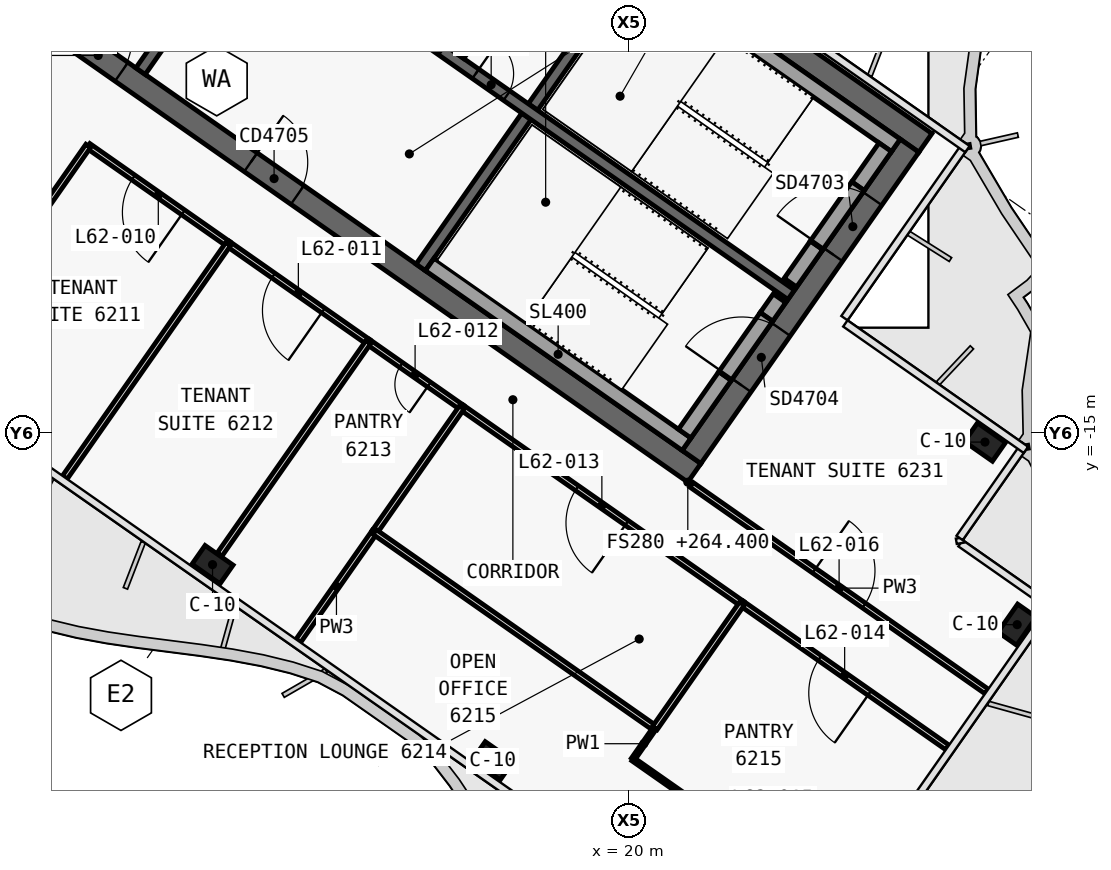
"""IFC4 building model, lengths in metres.
Left out: names, types, materials, properties, quantities, classifications, styles, units other than length and angle.
Written with IfcOpenShell. Run it as: python <this file> out.ifc"""

import sys

from ifc_helpers import new_model, si_unit, direction, frame, frame_2d, origin, origin_2d, place, context, subcontext, project, spatial, polyline, rectangle, outline, extrude, element, fill, save


model = new_model("IFC4")
c1 = context("Model", 3, precision=1e-05, world=origin(), true_north=direction((0.0, 1.0)))
c2 = subcontext(c1, "Body", "Model", "MODEL_VIEW")
j1 = project(units=[si_unit("LENGTHUNIT", "METRE"), si_unit("PLANEANGLEUNIT", "RADIAN")], contexts=[c1])
p1 = place(None, origin())
s1 = spatial("IfcSite", under=j1, at=p1, CompositionType="ELEMENT")
p2 = place(p1, origin())
s2 = spatial("IfcBuilding", under=s1, at=p2, CompositionType="ELEMENT")
p3 = place(p2, frame((0.0, 0.0, 264.4)))
s3 = spatial("IfcBuildingStorey", under=s2, at=p3, CompositionType="ELEMENT", Elevation=264.4)
p4 = place(p3, frame((0.028, 12.066, 0.0), z_axis=(0.0, 0.0, 1.0), x_axis=(0.819151382952, -0.573577380837, 0.0)))
e1 = element("IfcWall", 1, at=p4, inside=s3, PredefinedType="SHEAR", context=c2, shape_type="SweptSolid", body=[
    extrude(outline(polyline([(33.898, 0.3), (0.0, 0.3), (0.42, -0.3), (33.898, -0.3), (33.898, 0.3)])), origin(), (0.0, 0.0, 1.0), 3.9),
])
p5 = place(p3, frame((0.028, -0.874, 0.0), z_axis=(0.0, 0.0, 1.0), x_axis=(0.819150035022, -0.573579305871, 0.0)))
e2 = element("IfcWall", 2, at=p5, inside=s3, PredefinedType="SHEAR", context=c2, shape_type="SweptSolid", body=[
    extrude(outline(polyline([(26.476, 0.3), (0.0, 0.3), (0.42, -0.3), (26.476, -0.3), (26.476, 0.3)])), origin(), (0.0, 0.0, 1.0), 3.9),
])
p6 = place(p5, frame((6.576, 0.0, 0.0)))
e3 = element("IfcOpeningElement", 3, at=p6, cuts=e2, PredefinedType="OPENING", context=c2, shape_type="SweptSolid", body=[
    extrude(rectangle(XDim=1.5, YDim=2.1, at=frame_2d((0.75, 1.05))), frame((0.0, 0.31, 0.0), z_axis=(0.0, -1.0, 0.0), x_axis=(1.0, 0.0, 0.0)), (0.0, 0.0, 1.0), 0.62),
])
p7 = place(p5, frame((12.226, 0.0, 0.0)))
e4 = element("IfcOpeningElement", 4, at=p7, cuts=e2, PredefinedType="OPENING", context=c2, shape_type="SweptSolid", body=[
    extrude(rectangle(XDim=1.5, YDim=2.1, at=frame_2d((0.75, 1.05))), frame((0.0, 0.31, 0.0), z_axis=(0.0, -1.0, 0.0), x_axis=(1.0, 0.0, 0.0)), (0.0, 0.0, 1.0), 0.62),
])
p8 = place(p3, frame((21.642, -15.642, 0.0), z_axis=(0.0, 0.0, 1.0), x_axis=(0.573586866468, 0.819144740944, 0.0)))
e5 = element("IfcWall", 5, at=p8, inside=s3, PredefinedType="SHEAR", context=c2, shape_type="SweptSolid", body=[
    extrude(outline(polyline([(10.0, 0.3), (0.0, 0.3), (0.0, -0.3), (10.0, -0.3), (10.0, 0.3)])), origin(), (0.0, 0.0, 1.0), 3.9),
])
p9 = place(p8, frame((6.5, 0.0, 0.0)))
e6 = element("IfcOpeningElement", 6, at=p9, cuts=e5, PredefinedType="OPENING", context=c2, shape_type="SweptSolid", body=[
    extrude(rectangle(XDim=1.8, YDim=2.1, at=frame_2d((0.9, 1.05))), frame((0.0, 0.31, 0.0), z_axis=(0.0, -1.0, 0.0), x_axis=(1.0, 0.0, 0.0)), (0.0, 0.0, 1.0), 0.62),
])
p10 = place(p8, frame((2.3, 0.0, 0.0)))
e7 = element("IfcOpeningElement", 7, at=p10, cuts=e5, PredefinedType="OPENING", context=c2, shape_type="SweptSolid", body=[
    extrude(rectangle(XDim=1.8, YDim=2.1, at=frame_2d((0.9, 1.05))), frame((0.0, 0.31, 0.0), z_axis=(0.0, -1.0, 0.0), x_axis=(1.0, 0.0, 0.0)), (0.0, 0.0, 1.0), 0.62),
])
p11 = place(p3, frame((7.143, -5.49, 0.0), z_axis=(0.0, 0.0, 1.0), x_axis=(0.573617744349, 0.819123118565, 0.0)))
e8 = element("IfcWall", 8, at=p11, inside=s3, PredefinedType="SHEAR", context=c2, shape_type="SweptSolid", body=[
    extrude(outline(polyline([(0.0, 0.15), (0.0, -0.15), (4.85, -0.15), (4.85, 0.15), (0.0, 0.15)])), origin(), (0.0, 0.0, 1.0), 3.9),
])
p12 = place(p3, frame((14.515, -10.652, 0.0), z_axis=(0.0, 0.0, 1.0), x_axis=(0.573560315113, 0.819163332265, 0.0)))
e9 = element("IfcWall", 9, at=p12, inside=s3, PredefinedType="SHEAR", context=c2, shape_type="SweptSolid", body=[
    extrude(outline(polyline([(0.0, 0.15), (0.0, -0.15), (4.85, -0.15), (4.85, 0.15), (0.0, 0.15)])), origin(), (0.0, 0.0, 1.0), 3.9),
])
p13 = place(p3, frame((17.469, -6.433, 0.0), z_axis=(0.0, 0.0, 1.0), x_axis=(0.573594092424, 0.81913968109, 0.0)))
e10 = element("IfcWall", 10, at=p13, inside=s3, PredefinedType="SHEAR", context=c2, shape_type="SweptSolid", body=[
    extrude(outline(polyline([(4.85, -0.15), (4.85, 0.15), (0.0, 0.15), (0.0, -0.15), (4.85, -0.15)])), origin(), (0.0, 0.0, 1.0), 3.9),
])
p14 = place(p3, frame((2.638, 3.768, 0.0), z_axis=(0.0, 0.0, 1.0), x_axis=(0.819155014212, -0.573572194837, 0.0)))
e11 = element("IfcWall", 11, at=p14, inside=s3, PredefinedType="SHEAR", context=c2, shape_type="SweptSolid", body=[
    extrude(outline(polyline([(0.0, 0.15), (0.0, -0.15), (26.4, -0.15), (26.4, 0.15), (0.0, 0.15)])), origin(), (0.0, 0.0, 1.0), 3.9),
])
p15 = place(p14, frame((9.637, 0.0, 0.0)))
e12 = element("IfcOpeningElement", 12, at=p15, cuts=e11, PredefinedType="OPENING", context=c2, shape_type="SweptSolid", body=[
    extrude(rectangle(XDim=1.2, YDim=2.1, at=frame_2d((0.6, 1.05))), frame((0.0, 0.16, 0.0), z_axis=(0.0, -1.0, 0.0), x_axis=(1.0, 0.0, 0.0)), (0.0, 0.0, 1.0), 0.32),
])
p16 = place(p14, frame((11.812, 0.0, 0.0)))
e13 = element("IfcOpeningElement", 13, at=p16, cuts=e11, PredefinedType="OPENING", context=c2, shape_type="SweptSolid", body=[
    extrude(rectangle(XDim=1.2, YDim=2.1, at=frame_2d((0.6, 1.05))), frame((0.0, 0.16, 0.0), z_axis=(0.0, -1.0, 0.0), x_axis=(1.0, 0.0, 0.0)), (0.0, 0.0, 1.0), 0.32),
])
p17 = place(p14, frame((13.988, 0.0, 0.0)))
e14 = element("IfcOpeningElement", 14, at=p17, cuts=e11, PredefinedType="OPENING", context=c2, shape_type="SweptSolid", body=[
    extrude(rectangle(XDim=1.2, YDim=2.1, at=frame_2d((0.6, 1.05))), frame((0.0, 0.16, 0.0), z_axis=(0.0, -1.0, 0.0), x_axis=(1.0, 0.0, 0.0)), (0.0, 0.0, 1.0), 0.32),
])
p18 = place(p14, frame((16.262, 0.0, 0.0)))
e15 = element("IfcOpeningElement", 15, at=p18, cuts=e11, PredefinedType="OPENING", context=c2, shape_type="SweptSolid", body=[
    extrude(rectangle(XDim=1.0, YDim=2.1, at=frame_2d((0.5, 1.05))), frame((0.0, 0.16, 0.0), z_axis=(0.0, -1.0, 0.0), x_axis=(1.0, 0.0, 0.0)), (0.0, 0.0, 1.0), 0.32),
])
for number, where, z_axis, x_axis in (
    (16, (9.038, -18.475, 0.0), (0.0, 0.0, 1.0), (0.819, -0.574, 0.0)),
    (17, (16.41, -23.637, 0.0), (0.0, 0.0, 1.0), (0.819, -0.574, 0.0)),
    (18, (29.363, -15.25, 0.0), (0.0, 0.0, 1.0), (0.819, -0.574, 0.0)),
    (19, (30.21, -20.055, 0.0), (0.0, 0.0, 1.0), (0.574, 0.819, 0.0)),
):
    element("IfcColumn", number, at=place(p3, frame(where, z_axis=z_axis, x_axis=x_axis)), inside=s3, PredefinedType="COLUMN", context=c2, shape_type="SweptSolid", body=[
        extrude(rectangle(XDim=0.9, YDim=0.6, at=origin_2d()), origin(), (0.0, 0.0, 1.0), 3.9),
    ])
p19 = place(p3, frame((15.565, -5.1, 0.0), z_axis=(0.0, 0.0, 1.0), x_axis=(0.573560315113, 0.819163332265, 0.0)))
e20 = element("IfcWall", 20, at=p19, inside=s3, PredefinedType="SOLIDWALL", context=c2, shape_type="SweptSolid", body=[
    extrude(rectangle(XDim=4.85, YDim=0.2, at=frame_2d((2.425, 0.0))), origin(), (0.0, 0.0, 1.0), 3.9),
])
p20 = place(p3, frame((20.259, -2.71, 0.0), z_axis=(0.0, 0.0, 1.0), x_axis=(0.81914849389, -0.573581506813, 0.0)))
e21 = element("IfcWall", 21, at=p20, inside=s3, PredefinedType="SOLIDWALL", context=c2, shape_type="SweptSolid", body=[
    extrude(rectangle(XDim=8.25, YDim=0.4, at=frame_2d((4.125, 0.0))), origin(), (0.0, 0.0, 1.0), 3.62),
])
p21 = place(p3, frame((24.244, -11.055, 0.0), z_axis=(0.0, 0.0, 1.0), x_axis=(0.573571582932, 0.819155442668, 0.0)))
e22 = element("IfcWall", 22, at=p21, inside=s3, PredefinedType="SOLIDWALL", context=c2, shape_type="SweptSolid", body=[
    extrude(rectangle(XDim=1.2, YDim=0.4, at=frame_2d((0.6, 0.0))), origin(), (0.0, 0.0, 1.0), 3.62),
])
p22 = place(p3, frame((26.022, -8.515, 0.0), z_axis=(0.0, 0.0, 1.0), x_axis=(0.573619628835, 0.819121798889, 0.0)))
e23 = element("IfcWall", 23, at=p22, inside=s3, PredefinedType="SOLIDWALL", context=c2, shape_type="SweptSolid", body=[
    extrude(rectangle(XDim=1.25, YDim=0.4, at=frame_2d((0.625, 0.0))), origin(), (0.0, 0.0, 1.0), 3.62),
])
p23 = place(p3, frame((24.932, -10.072, 2.15), z_axis=(0.0, 0.0, 1.0), x_axis=(0.573591692345, 0.819141361715, 0.0)))
e24 = element("IfcWall", 24, at=p23, inside=s3, PredefinedType="SOLIDWALL", context=c2, shape_type="SweptSolid", body=[
    extrude(rectangle(XDim=1.9, YDim=0.4, at=frame_2d((0.95, 0.0))), origin(), (0.0, 0.0, 1.0), 1.47),
])
p24 = place(p3, frame((14.753, -10.574, 0.0), z_axis=(0.0, 0.0, 1.0), x_axis=(0.819158229677, -0.573567602601, 0.0)))
e25 = element("IfcWall", 25, at=p24, inside=s3, PredefinedType="SOLIDWALL", context=c2, shape_type="SweptSolid", body=[
    extrude(rectangle(XDim=8.25, YDim=0.4, at=frame_2d((4.125, 0.0))), origin(), (0.0, 0.0, 1.0), 3.62),
])
p25 = place(p3, frame((21.462, -15.028, 0.0), z_axis=(0.0, 0.0, 1.0), x_axis=(0.573559770908, 0.819163713305, 0.0)))
e26 = element("IfcWall", 26, at=p25, inside=s3, PredefinedType="SOLIDWALL", context=c2, shape_type="SweptSolid", body=[
    extrude(rectangle(XDim=1.85, YDim=0.4, at=frame_2d((0.925, 0.0))), origin(), (0.0, 0.0, 1.0), 3.62),
])
p26 = place(p3, frame((23.613, -11.956, 0.0), z_axis=(0.0, 0.0, 1.0), x_axis=(0.573435029941, 0.819251039936, 0.0)))
e27 = element("IfcWall", 27, at=p26, inside=s3, PredefinedType="SOLIDWALL", context=c2, shape_type="SweptSolid", body=[
    extrude(rectangle(XDim=0.6, YDim=0.4, at=frame_2d((0.3, 0.0))), origin(), (0.0, 0.0, 1.0), 3.62),
])
p27 = place(p3, frame((22.523, -13.512, 2.15), z_axis=(0.0, 0.0, 1.0), x_axis=(0.573591692345, 0.819141361715, 0.0)))
e28 = element("IfcWall", 28, at=p27, inside=s3, PredefinedType="SOLIDWALL", context=c2, shape_type="SweptSolid", body=[
    extrude(rectangle(XDim=1.9, YDim=0.4, at=frame_2d((0.95, 0.0))), origin(), (0.0, 0.0, 1.0), 1.47),
])
p28 = place(p3, frame((21.642, -16.375, 0.0), z_axis=(0.0, 0.0, 1.0), x_axis=(0.819154480923, -0.573572956461, 0.0)))
e29 = element("IfcWall", 29, at=p28, inside=s3, PredefinedType="PARTITIONING", context=c2, shape_type="SweptSolid", body=[
    extrude(rectangle(XDim=9.48, YDim=0.15, at=frame_2d((4.74, 0.0))), origin(), (0.0, 0.0, 1.0), 3.0),
])
p29 = place(p28, frame((3.94, 0.0, 0.0)))
e30 = element("IfcOpeningElement", 30, at=p29, cuts=e29, PredefinedType="OPENING", context=c2, shape_type="SweptSolid", body=[
    extrude(rectangle(XDim=1.6, YDim=2.1, at=frame_2d((0.8, 1.05))), frame((0.0, 0.085, 0.0), z_axis=(0.0, -1.0, 0.0), x_axis=(1.0, 0.0, 0.0)), (0.0, 0.0, 1.0), 0.17),
])
p30 = place(p3, frame((9.454, -10.038, 0.0), z_axis=(0.0, 0.0, 1.0), x_axis=(-0.819142740634, 0.573589723117, 0.0)))
e31 = element("IfcWall", 31, at=p30, inside=s3, PredefinedType="PARTITIONING", context=c2, shape_type="SweptSolid", body=[
    extrude(rectangle(XDim=4.502, YDim=0.15, at=frame_2d((2.251, 0.0))), origin(), (0.0, 0.0, 1.0), 3.05),
])
p31 = place(p30, frame((1.451, 0.0, 0.0)))
e32 = element("IfcOpeningElement", 32, at=p31, cuts=e31, PredefinedType="OPENING", context=c2, shape_type="SweptSolid", body=[
    extrude(rectangle(XDim=1.6, YDim=2.1, at=frame_2d((0.8, 1.05))), frame((0.0, 0.085, 0.0), z_axis=(0.0, -1.0, 0.0), x_axis=(1.0, 0.0, 0.0)), (0.0, 0.0, 1.0), 0.17),
])
p32 = place(p3, frame((13.14, -12.619, 0.0), z_axis=(0.0, 0.0, 1.0), x_axis=(-0.819165703328, 0.573556928727, 0.0)))
e33 = element("IfcWall", 33, at=p32, inside=s3, PredefinedType="PARTITIONING", context=c2, shape_type="SweptSolid", body=[
    extrude(rectangle(XDim=4.504, YDim=0.15, at=frame_2d((2.252, 0.0))), origin(), (0.0, 0.0, 1.0), 3.05),
])
p33 = place(p32, frame((1.452, 0.0, 0.0)))
e34 = element("IfcOpeningElement", 34, at=p33, cuts=e33, PredefinedType="OPENING", context=c2, shape_type="SweptSolid", body=[
    extrude(rectangle(XDim=1.6, YDim=2.1, at=frame_2d((0.8, 1.05))), frame((0.0, 0.085, 0.0), z_axis=(0.0, -1.0, 0.0), x_axis=(1.0, 0.0, 0.0)), (0.0, 0.0, 1.0), 0.17),
])
p34 = place(p3, frame((15.598, -14.34, 0.0), z_axis=(0.0, 0.0, 1.0), x_axis=(-0.81916700466, 0.573555070134, 0.0)))
e35 = element("IfcWall", 35, at=p34, inside=s3, PredefinedType="PARTITIONING", context=c2, shape_type="SweptSolid", body=[
    extrude(rectangle(XDim=3.004, YDim=0.15, at=frame_2d((1.502, 0.0))), origin(), (0.0, 0.0, 1.0), 3.05),
])
p35 = place(p34, frame((1.052, 0.0, 0.0)))
e36 = element("IfcOpeningElement", 36, at=p35, cuts=e35, PredefinedType="OPENING", context=c2, shape_type="SweptSolid", body=[
    extrude(rectangle(XDim=0.9, YDim=2.1, at=frame_2d((0.45, 1.05))), frame((0.0, 0.085, 0.0), z_axis=(0.0, -1.0, 0.0), x_axis=(1.0, 0.0, 0.0)), (0.0, 0.0, 1.0), 0.17),
])
p36 = place(p3, frame((22.97, -19.502, 0.0), z_axis=(0.0, 0.0, 1.0), x_axis=(-0.819151661297, 0.57357698332, 0.0)))
e37 = element("IfcWall", 37, at=p36, inside=s3, PredefinedType="PARTITIONING", context=c2, shape_type="SweptSolid", body=[
    extrude(rectangle(XDim=9.004, YDim=0.15, at=frame_2d((4.502, 0.0))), origin(), (0.0, 0.0, 1.0), 3.05),
])
p37 = place(p36, frame((3.702, 0.0, 0.0)))
e38 = element("IfcOpeningElement", 38, at=p37, cuts=e37, PredefinedType="OPENING", context=c2, shape_type="SweptSolid", body=[
    extrude(rectangle(XDim=1.6, YDim=2.1, at=frame_2d((0.8, 1.05))), frame((0.0, 0.085, 0.0), z_axis=(0.0, -1.0, 0.0), x_axis=(1.0, 0.0, 0.0)), (0.0, 0.0, 1.0), 0.17),
])
p38 = place(p3, frame((28.375, -23.287, 0.0), z_axis=(0.0, 0.0, 1.0), x_axis=(-0.81915199888, 0.573576501202, 0.0)))
e39 = element("IfcWall", 39, at=p38, inside=s3, PredefinedType="PARTITIONING", context=c2, shape_type="SweptSolid", body=[
    extrude(rectangle(XDim=6.602, YDim=0.15, at=frame_2d((3.301, 0.0))), origin(), (0.0, 0.0, 1.0), 3.0),
])
p39 = place(p38, frame((2.501, 0.0, 0.0)))
e40 = element("IfcOpeningElement", 40, at=p39, cuts=e39, PredefinedType="OPENING", context=c2, shape_type="SweptSolid", body=[
    extrude(rectangle(XDim=1.6, YDim=2.1, at=frame_2d((0.8, 1.05))), frame((0.0, 0.085, 0.0), z_axis=(0.0, -1.0, 0.0), x_axis=(1.0, 0.0, 0.0)), (0.0, 0.0, 1.0), 0.17),
])
p40 = place(p3, frame((9.452, -10.037, 0.0), z_axis=(0.0, 0.0, 1.0), x_axis=(-0.573575945067, -0.81915238829, 0.0)))
e41 = element("IfcWall", 41, at=p40, inside=s3, PredefinedType="PARTITIONING", context=c2, shape_type="SweptSolid", body=[
    extrude(rectangle(XDim=7.5, YDim=0.15, at=frame_2d((3.75, 0.0))), origin(), (0.0, 0.0, 1.0), 3.0),
])
p41 = place(p3, frame((1.849, -13.051, 0.0), z_axis=(0.0, 0.0, 1.0), x_axis=(0.573577493031, 0.819151304393, 0.0)))
e42 = element("IfcWall", 42, at=p41, inside=s3, PredefinedType="PARTITIONING", context=c2, shape_type="SweptSolid", body=[
    extrude(rectangle(XDim=6.83, YDim=0.15, at=frame_2d((3.415, 0.0))), origin(), (0.0, 0.0, 1.0), 3.05),
])
p42 = place(p3, frame((13.139, -12.618, 0.0), z_axis=(0.0, 0.0, 1.0), x_axis=(-0.573560698343, -0.819163063936, 0.0)))
e43 = element("IfcWall", 43, at=p42, inside=s3, PredefinedType="PARTITIONING", context=c2, shape_type="SweptSolid", body=[
    extrude(rectangle(XDim=6.83, YDim=0.15, at=frame_2d((3.415, 0.0))), origin(), (0.0, 0.0, 1.0), 3.05),
])
p43 = place(p3, frame((15.596, -14.339, 0.0), z_axis=(0.0, 0.0, 1.0), x_axis=(-0.573560601885, -0.819163131473, 0.0)))
e44 = element("IfcWall", 44, at=p43, inside=s3, PredefinedType="PARTITIONING", context=c2, shape_type="SweptSolid", body=[
    extrude(rectangle(XDim=4.002, YDim=0.15, at=frame_2d((2.001, 0.0))), origin(), (0.0, 0.0, 1.0), 3.62),
])
p44 = place(p3, frame((13.302, -17.615, 0.0), z_axis=(0.0, 0.0, 1.0), x_axis=(-0.573560622794, -0.819163116834, 0.0)))
e45 = element("IfcWall", 45, at=p44, inside=s3, PredefinedType="PARTITIONING", context=c2, shape_type="SweptSolid", body=[
    extrude(rectangle(XDim=3.501, YDim=0.15, at=frame_2d((1.75, 0.0))), origin(), (0.0, 0.0, 1.0), 3.0),
])
p45 = place(p3, frame((20.674, -22.778, 0.0), z_axis=(0.0, 0.0, 1.0), x_axis=(-0.819141427692, 0.573591598124, 0.0)))
e46 = element("IfcWall", 46, at=p45, inside=s3, PredefinedType="PARTITIONING", context=c2, shape_type="SweptSolid", body=[
    extrude(rectangle(XDim=9.0, YDim=0.15, at=frame_2d((4.5, 0.0))), origin(), (0.0, 0.0, 1.0), 3.05),
])
p46 = place(p3, frame((22.969, -19.501, 0.0), z_axis=(0.0, 0.0, 1.0), x_axis=(-0.573556557423, -0.819165963305, 0.0)))
e47 = element("IfcWall", 47, at=p46, inside=s3, PredefinedType="PARTITIONING", context=c2, shape_type="SweptSolid", body=[
    extrude(rectangle(XDim=4.0, YDim=0.15, at=frame_2d((2.0, 0.0))), origin(), (0.0, 0.0, 1.0), 3.05),
])
p47 = place(p3, frame((20.1, -23.597, 0.0), z_axis=(0.0, 0.0, 1.0), x_axis=(0.573544276158, 0.819174562158, 0.0)))
e48 = element("IfcWall", 48, at=p47, inside=s3, PredefinedType="PARTITIONING", context=c2, shape_type="SweptSolid", body=[
    extrude(rectangle(XDim=1.0, YDim=0.1, at=frame_2d((0.5, 0.0))), origin(), (0.0, 0.0, 1.0), 3.62),
])
p48 = place(p3, frame((23.049, -25.662, 0.0), z_axis=(0.0, 0.0, 1.0), x_axis=(-0.81914589004, 0.573585225429, 0.0)))
e49 = element("IfcWall", 49, at=p48, inside=s3, PredefinedType="PARTITIONING", context=c2, shape_type="SweptSolid", body=[
    extrude(rectangle(XDim=3.6, YDim=0.1, at=frame_2d((1.8, 0.0))), origin(), (0.0, 0.0, 1.0), 3.05),
])
p49 = place(p48, frame((1.35, 0.0, 0.0)))
e50 = element("IfcOpeningElement", 50, at=p49, cuts=e49, PredefinedType="OPENING", context=c2, shape_type="SweptSolid", body=[
    extrude(rectangle(XDim=0.9, YDim=2.1, at=frame_2d((0.45, 1.05))), frame((0.0, 0.06, 0.0), z_axis=(0.0, -1.0, 0.0), x_axis=(1.0, 0.0, 0.0)), (0.0, 0.0, 1.0), 0.12),
])
p50 = place(p18, origin())
e51 = element("IfcDoor", 51, at=p50, inside=s3, OperationType="SINGLE_SWING_RIGHT", PredefinedType="DOOR", context=c2, shape_type="SweptSolid", body=[
    extrude(rectangle(XDim=1.0, YDim=2.1, at=frame_2d((0.5, 1.05))), frame((0.0, 0.025, 0.0), z_axis=(0.0, -1.0, 0.0), x_axis=(1.0, 0.0, 0.0)), (0.0, 0.0, 1.0), 0.05),
])
fill(e15, e51)
p51 = place(p6, origin())
e52 = element("IfcDoor", 52, at=p51, inside=s3, OperationType="SINGLE_SWING_RIGHT", PredefinedType="DOOR", context=c2, shape_type="SweptSolid", body=[
    extrude(rectangle(XDim=1.5, YDim=2.1, at=frame_2d((0.75, 1.05))), frame((0.0, 0.025, 0.0), z_axis=(0.0, -1.0, 0.0), x_axis=(1.0, 0.0, 0.0)), (0.0, 0.0, 1.0), 0.05),
])
fill(e3, e52)
p52 = place(p7, origin())
e53 = element("IfcDoor", 53, at=p52, inside=s3, OperationType="DOUBLE_DOOR_SINGLE_SWING", PredefinedType="DOOR", context=c2, shape_type="SweptSolid", body=[
    extrude(rectangle(XDim=1.5, YDim=2.1, at=frame_2d((0.75, 1.05))), frame((0.0, 0.025, 0.0), z_axis=(0.0, -1.0, 0.0), x_axis=(1.0, 0.0, 0.0)), (0.0, 0.0, 1.0), 0.05),
])
fill(e4, e53)
p53 = place(p9, origin())
e54 = element("IfcDoor", 54, at=p53, inside=s3, OperationType="DOUBLE_DOOR_SINGLE_SWING", PredefinedType="DOOR", context=c2, shape_type="SweptSolid", body=[
    extrude(rectangle(XDim=1.8, YDim=2.1, at=frame_2d((0.9, 1.05))), frame((0.0, 0.025, 0.0), z_axis=(0.0, -1.0, 0.0), x_axis=(1.0, 0.0, 0.0)), (0.0, 0.0, 1.0), 0.05),
])
fill(e6, e54)
p54 = place(p10, origin())
e55 = element("IfcDoor", 55, at=p54, inside=s3, OperationType="DOUBLE_DOOR_SINGLE_SWING", PredefinedType="DOOR", context=c2, shape_type="SweptSolid", body=[
    extrude(rectangle(XDim=1.8, YDim=2.1, at=frame_2d((0.9, 1.05))), frame((0.0, 0.025, 0.0), z_axis=(0.0, -1.0, 0.0), x_axis=(1.0, 0.0, 0.0)), (0.0, 0.0, 1.0), 0.05),
])
fill(e7, e55)
p55 = place(p31, origin())
e56 = element("IfcDoor", 56, at=p55, inside=s3, OperationType="DOUBLE_DOOR_SINGLE_SWING", PredefinedType="DOOR", context=c2, shape_type="SweptSolid", body=[
    extrude(rectangle(XDim=1.6, YDim=2.1, at=frame_2d((0.8, 1.05))), frame((0.0, 0.025, 0.0), z_axis=(0.0, -1.0, 0.0), x_axis=(1.0, 0.0, 0.0)), (0.0, 0.0, 1.0), 0.05),
])
fill(e32, e56)
p56 = place(p33, origin())
e57 = element("IfcDoor", 57, at=p56, inside=s3, OperationType="DOUBLE_DOOR_SINGLE_SWING", PredefinedType="DOOR", context=c2, shape_type="SweptSolid", body=[
    extrude(rectangle(XDim=1.6, YDim=2.1, at=frame_2d((0.8, 1.05))), frame((0.0, 0.025, 0.0), z_axis=(0.0, -1.0, 0.0), x_axis=(1.0, 0.0, 0.0)), (0.0, 0.0, 1.0), 0.05),
])
fill(e34, e57)
p57 = place(p35, origin())
e58 = element("IfcDoor", 58, at=p57, inside=s3, OperationType="SINGLE_SWING_LEFT", PredefinedType="DOOR", context=c2, shape_type="SweptSolid", body=[
    extrude(rectangle(XDim=0.9, YDim=2.1, at=frame_2d((0.45, 1.05))), frame((0.0, 0.025, 0.0), z_axis=(0.0, -1.0, 0.0), x_axis=(1.0, 0.0, 0.0)), (0.0, 0.0, 1.0), 0.05),
])
fill(e36, e58)
p58 = place(p37, origin())
e59 = element("IfcDoor", 59, at=p58, inside=s3, OperationType="DOUBLE_DOOR_SINGLE_SWING", PredefinedType="DOOR", context=c2, shape_type="SweptSolid", body=[
    extrude(rectangle(XDim=1.6, YDim=2.1, at=frame_2d((0.8, 1.05))), frame((0.0, 0.025, 0.0), z_axis=(0.0, -1.0, 0.0), x_axis=(1.0, 0.0, 0.0)), (0.0, 0.0, 1.0), 0.05),
])
fill(e38, e59)
p59 = place(p39, origin())
e60 = element("IfcDoor", 60, at=p59, inside=s3, OperationType="DOUBLE_DOOR_SINGLE_SWING", PredefinedType="DOOR", context=c2, shape_type="SweptSolid", body=[
    extrude(rectangle(XDim=1.6, YDim=2.1, at=frame_2d((0.8, 1.05))), frame((0.0, 0.025, 0.0), z_axis=(0.0, -1.0, 0.0), x_axis=(1.0, 0.0, 0.0)), (0.0, 0.0, 1.0), 0.05),
])
fill(e40, e60)
p60 = place(p49, origin())
e61 = element("IfcDoor", 61, at=p60, inside=s3, OperationType="SINGLE_SWING_LEFT", PredefinedType="DOOR", context=c2, shape_type="SweptSolid", body=[
    extrude(rectangle(XDim=0.9, YDim=2.1, at=frame_2d((0.45, 1.05))), frame((0.0, 0.025, 0.0), z_axis=(0.0, -1.0, 0.0), x_axis=(1.0, 0.0, 0.0)), (0.0, 0.0, 1.0), 0.05),
])
fill(e50, e61)
p61 = place(p29, origin())
e62 = element("IfcDoor", 62, at=p61, inside=s3, OperationType="DOUBLE_DOOR_SINGLE_SWING", PredefinedType="DOOR", context=c2, shape_type="SweptSolid", body=[
    extrude(rectangle(XDim=1.6, YDim=2.1, at=frame_2d((0.8, 1.05))), frame((0.0, 0.025, 0.0), z_axis=(0.0, -1.0, 0.0), x_axis=(1.0, 0.0, 0.0)), (0.0, 0.0, 1.0), 0.05),
])
fill(e30, e62)
save(model, sys.argv[1])
